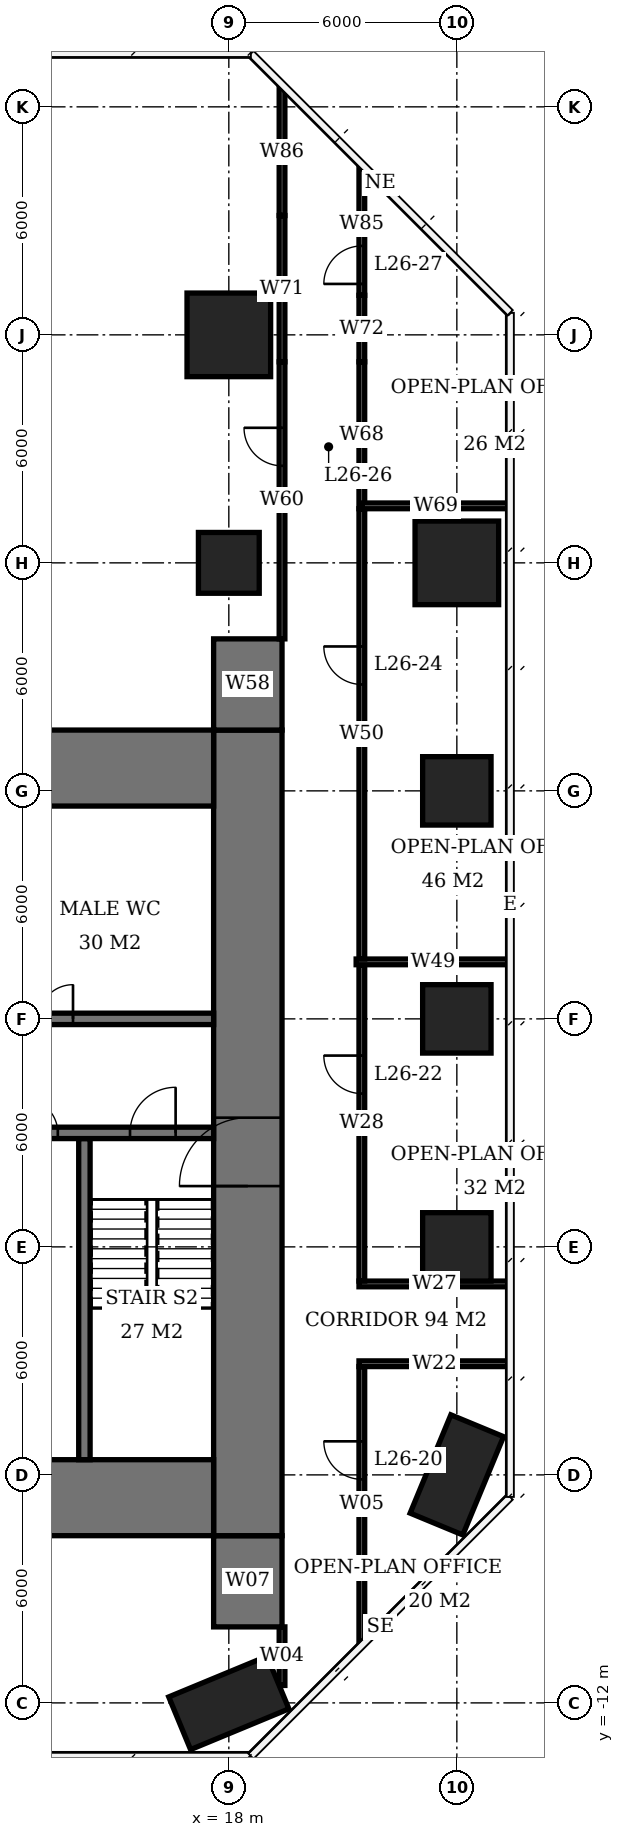
"""IFC4 building model, lengths in metres.
Left out: names, types, materials, properties, quantities, classifications, styles, units other than length and angle.
Written with IfcOpenShell. Run it as: python <this file> out.ifc"""

import sys

from ifc_helpers import new_model, si_unit, direction, frame, frame_2d, origin, origin_2d, place, context, subcontext, project, spatial, rectangle, extrude, element, fill, save


model = new_model("IFC4")
c1 = context("Model", 3, precision=1e-05, world=origin(), true_north=direction((0.0, 1.0)))
c2 = subcontext(c1, "Body", "Model", "MODEL_VIEW")
j1 = project(units=[si_unit("LENGTHUNIT", "METRE"), si_unit("PLANEANGLEUNIT", "RADIAN")], contexts=[c1])
p1 = place(None, origin())
s1 = spatial("IfcSite", under=j1, at=p1, CompositionType="ELEMENT")
p2 = place(p1, origin())
s2 = spatial("IfcBuilding", under=s1, at=p2, CompositionType="ELEMENT")
p3 = place(p2, frame((0.0, 0.0, 109.4)))
s3 = spatial("IfcBuildingStorey", under=s2, at=p3, CompositionType="ELEMENT", Elevation=109.4)
p4 = place(p3, frame((18.0, -12.0, 0.0), z_axis=(0.0, 0.0, 1.0), x_axis=(-0.923879532511, -0.382683432365, 0.0)))
e1 = element("IfcColumn", 1, at=p4, inside=s3, PredefinedType="COLUMN", context=c2, shape_type="SweptSolid", body=[
    extrude(rectangle(XDim=2.8, YDim=1.5, at=origin_2d()), origin(), (0.0, 0.0, 1.0), 3.9),
])
p5 = place(p3, frame((18.0, 18.0, 0.0), z_axis=(0.0, 0.0, 1.0), x_axis=(1.0, 0.0, 0.0)))
e2 = element("IfcColumn", 2, at=p5, inside=s3, PredefinedType="COLUMN", context=c2, shape_type="SweptSolid", body=[
    extrude(rectangle(XDim=1.6, YDim=1.6, at=origin_2d()), origin(), (0.0, 0.0, 1.0), 3.9),
])
p6 = place(p3, frame((18.0, 24.0, 0.0), z_axis=(0.0, 0.0, 1.0), x_axis=(1.0, 0.0, 0.0)))
e3 = element("IfcColumn", 3, at=p6, inside=s3, PredefinedType="COLUMN", context=c2, shape_type="SweptSolid", body=[
    extrude(rectangle(XDim=2.2, YDim=2.2, at=origin_2d()), origin(), (0.0, 0.0, 1.0), 3.9),
])
p7 = place(p3, frame((24.0, -6.0, 0.0), z_axis=(0.0, 0.0, 1.0), x_axis=(-0.382683432365, -0.923879532511, 0.0)))
e4 = element("IfcColumn", 4, at=p7, inside=s3, PredefinedType="COLUMN", context=c2, shape_type="SweptSolid", body=[
    extrude(rectangle(XDim=2.8, YDim=1.5, at=origin_2d()), origin(), (0.0, 0.0, 1.0), 3.9),
])
for number, where, z_axis, x_axis in (
    (5, (24.0, 0.0, 0.0), (0.0, 0.0, 1.0), (1.0, 0.0, 0.0)),
    (6, (24.0, 6.0, 0.0), (0.0, 0.0, 1.0), (1.0, 0.0, 0.0)),
    (7, (24.0, 12.0, 0.0), (0.0, 0.0, 1.0), (1.0, 0.0, 0.0)),
):
    element("IfcColumn", number, at=place(p3, frame(where, z_axis=z_axis, x_axis=x_axis)), inside=s3, PredefinedType="COLUMN", context=c2, shape_type="SweptSolid", body=[
        extrude(rectangle(XDim=1.8, YDim=1.8, at=origin_2d()), origin(), (0.0, 0.0, 1.0), 3.9),
    ])
p8 = place(p3, frame((24.0, 18.0, 0.0), z_axis=(0.0, 0.0, 1.0), x_axis=(1.0, 0.0, 0.0)))
e8 = element("IfcColumn", 8, at=p8, inside=s3, PredefinedType="COLUMN", context=c2, shape_type="SweptSolid", body=[
    extrude(rectangle(XDim=2.2, YDim=2.2, at=origin_2d()), origin(), (0.0, 0.0, 1.0), 3.9),
])
for number, where, z_axis, x_axis in (
    (9, (-5.6, -6.6, 0.0), (0.0, 0.0, 1.0), (1.0, 0.0, 0.0)),
    (10, (-5.6, 12.6, 0.0), (0.0, 0.0, 1.0), (1.0, 0.0, 0.0)),
):
    element("IfcWall", number, at=place(p3, frame(where, z_axis=z_axis, x_axis=x_axis)), inside=s3, PredefinedType="SHEAR", context=c2, shape_type="SweptSolid", body=[
        extrude(rectangle(XDim=23.2, YDim=2.0, at=frame_2d((11.6, 0.0))), origin(), (0.0, 0.0, 1.0), 3.9),
    ])
p9 = place(p3, frame((18.5, -7.6, 0.0), z_axis=(0.0, 0.0, 1.0), x_axis=(0.0, 1.0, 0.0)))
e11 = element("IfcWall", 11, at=p9, inside=s3, PredefinedType="SHEAR", context=c2, shape_type="SweptSolid", body=[
    extrude(rectangle(XDim=21.2, YDim=1.8, at=frame_2d((10.6, 0.0))), origin(), (0.0, 0.0, 1.0), 3.9),
])
p10 = place(p9, frame((9.2, 0.0, 0.0)))
e12 = element("IfcOpeningElement", 12, at=p10, cuts=e11, PredefinedType="OPENING", context=c2, shape_type="SweptSolid", body=[
    extrude(rectangle(XDim=1.8, YDim=2.4, at=frame_2d((0.9, 1.2))), frame((0.0, 0.91, 0.0), z_axis=(0.0, -1.0, 0.0), x_axis=(1.0, 0.0, 0.0)), (0.0, 0.0, 1.0), 1.82),
])
for number, where, z_axis, x_axis in (
    (13, (18.5, -10.0, 0.0), (0.0, 0.0, 1.0), (0.0, 1.0, 0.0)),
    (14, (18.5, 13.6, 0.0), (0.0, 0.0, 1.0), (0.0, 1.0, 0.0)),
):
    element("IfcWall", number, at=place(p3, frame(where, z_axis=z_axis, x_axis=x_axis)), inside=s3, PredefinedType="SHEAR", context=c2, shape_type="SweptSolid", body=[
        extrude(rectangle(XDim=2.4, YDim=1.8, at=frame_2d((1.2, 0.0))), origin(), (0.0, 0.0, 1.0), 3.9),
    ])
p11 = place(p3, frame((12.15, 3.0, 0.0), z_axis=(0.0, 0.0, 1.0), x_axis=(1.0, 0.0, 0.0)))
e15 = element("IfcWall", 15, at=p11, inside=s3, PredefinedType="SHEAR", context=c2, shape_type="SweptSolid", body=[
    extrude(rectangle(XDim=5.45, YDim=0.3, at=frame_2d((2.725, 0.0))), origin(), (0.0, 0.0, 1.0), 3.9),
])
p12 = place(p11, frame((3.25, 0.0, 0.0)))
e16 = element("IfcOpeningElement", 16, at=p12, cuts=e15, PredefinedType="OPENING", context=c2, shape_type="SweptSolid", body=[
    extrude(rectangle(XDim=1.2, YDim=2.1, at=frame_2d((0.6, 1.05))), frame((0.0, 0.16, 0.0), z_axis=(0.0, -1.0, 0.0), x_axis=(1.0, 0.0, 0.0)), (0.0, 0.0, 1.0), 0.32),
])
p13 = place(p11, frame((0.45, 0.0, 0.0)))
e17 = element("IfcOpeningElement", 17, at=p13, cuts=e15, PredefinedType="OPENING", context=c2, shape_type="SweptSolid", body=[
    extrude(rectangle(XDim=0.9, YDim=2.1, at=frame_2d((0.45, 1.05))), frame((0.0, 0.16, 0.0), z_axis=(0.0, -1.0, 0.0), x_axis=(1.0, 0.0, 0.0)), (0.0, 0.0, 1.0), 0.32),
])
p14 = place(p3, frame((-0.15, 6.0, 0.0), z_axis=(0.0, 0.0, 1.0), x_axis=(1.0, 0.0, 0.0)))
e18 = element("IfcWall", 18, at=p14, inside=s3, PredefinedType="SHEAR", context=c2, shape_type="SweptSolid", body=[
    extrude(rectangle(XDim=17.75, YDim=0.3, at=frame_2d((8.875, 0.0))), origin(), (0.0, 0.0, 1.0), 3.9),
])
p15 = place(p14, frame((13.15, 0.0, 0.0)))
e19 = element("IfcOpeningElement", 19, at=p15, cuts=e18, PredefinedType="OPENING", context=c2, shape_type="SweptSolid", body=[
    extrude(rectangle(XDim=0.9, YDim=2.1, at=frame_2d((0.45, 1.05))), frame((0.0, 0.16, 0.0), z_axis=(0.0, -1.0, 0.0), x_axis=(1.0, 0.0, 0.0)), (0.0, 0.0, 1.0), 0.32),
])
p16 = place(p14, frame((7.25, 0.0, 0.0)))
e20 = element("IfcOpeningElement", 20, at=p16, cuts=e18, PredefinedType="OPENING", context=c2, shape_type="SweptSolid", body=[
    extrude(rectangle(XDim=1.0, YDim=2.1, at=frame_2d((0.5, 1.05))), frame((0.0, 0.16, 0.0), z_axis=(0.0, -1.0, 0.0), x_axis=(1.0, 0.0, 0.0)), (0.0, 0.0, 1.0), 0.32),
])
p17 = place(p14, frame((1.1, 0.0, 0.0)))
e21 = element("IfcOpeningElement", 21, at=p17, cuts=e18, PredefinedType="OPENING", context=c2, shape_type="SweptSolid", body=[
    extrude(rectangle(XDim=1.1, YDim=2.1, at=frame_2d((0.55, 1.05))), frame((0.0, 0.16, 0.0), z_axis=(0.0, -1.0, 0.0), x_axis=(1.0, 0.0, 0.0)), (0.0, 0.0, 1.0), 0.32),
])
p18 = place(p14, frame((4.1, 0.0, 0.0)))
e22 = element("IfcOpeningElement", 22, at=p18, cuts=e18, PredefinedType="OPENING", context=c2, shape_type="SweptSolid", body=[
    extrude(rectangle(XDim=1.1, YDim=2.1, at=frame_2d((0.55, 1.05))), frame((0.0, 0.16, 0.0), z_axis=(0.0, -1.0, 0.0), x_axis=(1.0, 0.0, 0.0)), (0.0, 0.0, 1.0), 0.32),
])
p19 = place(p3, frame((14.2, -5.6, 0.0), z_axis=(0.0, 0.0, 1.0), x_axis=(0.0, 1.0, 0.0)))
e23 = element("IfcWall", 23, at=p19, inside=s3, PredefinedType="SHEAR", context=c2, shape_type="SweptSolid", body=[
    extrude(rectangle(XDim=8.45, YDim=0.3, at=frame_2d((4.225, 0.0))), origin(), (0.0, 0.0, 1.0), 3.9),
])
p20 = place(p3, frame((19.4, -11.541, 0.0), z_axis=(0.0, 0.0, 1.0), x_axis=(0.0, 1.0, 0.0)))
e24 = element("IfcWall", 24, at=p20, inside=s3, PredefinedType="PARTITIONING", context=c2, shape_type="SweptSolid", body=[
    extrude(rectangle(XDim=1.541, YDim=0.15, at=frame_2d((0.77, 0.0))), origin(), (0.0, 0.0, 1.0), 3.65),
])
p21 = place(p3, frame((19.4, 16.0, 0.0), z_axis=(0.0, 0.0, 1.0), x_axis=(0.0, 1.0, 0.0)))
e25 = element("IfcWall", 25, at=p21, inside=s3, PredefinedType="PARTITIONING", context=c2, shape_type="SweptSolid", body=[
    extrude(rectangle(XDim=7.29, YDim=0.15, at=frame_2d((3.645, 0.0))), origin(), (0.0, 0.0, 1.0), 3.65),
])
p22 = place(p21, frame((4.554, 0.0, 0.0)))
e26 = element("IfcOpeningElement", 26, at=p22, cuts=e25, PredefinedType="OPENING", context=c2, shape_type="SweptSolid", body=[
    extrude(rectangle(XDim=1.0, YDim=2.1, at=frame_2d((0.5, 1.05))), frame((0.0, 0.085, 0.0), z_axis=(0.0, -1.0, 0.0), x_axis=(1.0, 0.0, 0.0)), (0.0, 0.0, 1.0), 0.17),
])
p23 = place(p3, frame((19.4, 23.29, 0.0), z_axis=(0.0, 0.0, 1.0), x_axis=(0.0, 1.0, 0.0)))
e27 = element("IfcWall", 27, at=p23, inside=s3, PredefinedType="PARTITIONING", context=c2, shape_type="SweptSolid", body=[
    extrude(rectangle(XDim=3.85, YDim=0.15, at=frame_2d((1.925, 0.0))), origin(), (0.0, 0.0, 1.0), 2.65),
])
p24 = place(p3, frame((19.4, 27.14, 0.0), z_axis=(0.0, 0.0, 1.0), x_axis=(0.0, 1.0, 0.0)))
e28 = element("IfcWall", 28, at=p24, inside=s3, PredefinedType="PARTITIONING", context=c2, shape_type="SweptSolid", body=[
    extrude(rectangle(XDim=3.349, YDim=0.15, at=frame_2d((1.675, 0.0))), origin(), (0.0, 0.0, 1.0), 3.65),
])
p25 = place(p3, frame((21.5, -10.388, 0.0), z_axis=(0.0, 0.0, 1.0), x_axis=(0.0, 1.0, 0.0)))
e29 = element("IfcWall", 29, at=p25, inside=s3, PredefinedType="PARTITIONING", context=c2, shape_type="SweptSolid", body=[
    extrude(rectangle(XDim=7.238, YDim=0.15, at=frame_2d((3.619, 0.0))), origin(), (0.0, 0.0, 1.0), 3.65),
])
p26 = place(p25, frame((4.271, 0.0, 0.0)))
e30 = element("IfcOpeningElement", 30, at=p26, cuts=e29, PredefinedType="OPENING", context=c2, shape_type="SweptSolid", body=[
    extrude(rectangle(XDim=1.0, YDim=2.1, at=frame_2d((0.5, 1.05))), frame((0.0, 0.085, 0.0), z_axis=(0.0, -1.0, 0.0), x_axis=(1.0, 0.0, 0.0)), (0.0, 0.0, 1.0), 0.17),
])
p27 = place(p3, frame((21.425, -3.075, 0.0), z_axis=(0.0, 0.0, 1.0), x_axis=(1.0, 0.0, 0.0)))
e31 = element("IfcWall", 31, at=p27, inside=s3, PredefinedType="PARTITIONING", context=c2, shape_type="SweptSolid", body=[
    extrude(rectangle(XDim=3.975, YDim=0.15, at=frame_2d((1.987, 0.0))), origin(), (0.0, 0.0, 1.0), 3.65),
])
p28 = place(p3, frame((21.5, -0.9, 0.0), z_axis=(0.0, 0.0, 1.0), x_axis=(0.0, 1.0, 0.0)))
e32 = element("IfcWall", 32, at=p28, inside=s3, PredefinedType="PARTITIONING", context=c2, shape_type="SweptSolid", body=[
    extrude(rectangle(XDim=8.325, YDim=0.15, at=frame_2d((4.163, 0.0))), origin(), (0.0, 0.0, 1.0), 3.65),
])
p29 = place(p28, frame((4.934, 0.0, 0.0)))
e33 = element("IfcOpeningElement", 33, at=p29, cuts=e32, PredefinedType="OPENING", context=c2, shape_type="SweptSolid", body=[
    extrude(rectangle(XDim=1.0, YDim=2.1, at=frame_2d((0.5, 1.05))), frame((0.0, 0.085, 0.0), z_axis=(0.0, -1.0, 0.0), x_axis=(1.0, 0.0, 0.0)), (0.0, 0.0, 1.0), 0.17),
])
p30 = place(p3, frame((21.425, -0.975, 0.0), z_axis=(0.0, 0.0, 1.0), x_axis=(1.0, 0.0, 0.0)))
e34 = element("IfcWall", 34, at=p30, inside=s3, PredefinedType="PARTITIONING", context=c2, shape_type="SweptSolid", body=[
    extrude(rectangle(XDim=3.975, YDim=0.15, at=frame_2d((1.987, 0.0))), origin(), (0.0, 0.0, 1.0), 3.65),
])
p31 = place(p3, frame((21.5, 7.575, 0.0), z_axis=(0.0, 0.0, 1.0), x_axis=(0.0, 1.0, 0.0)))
e35 = element("IfcWall", 35, at=p31, inside=s3, PredefinedType="PARTITIONING", context=c2, shape_type="SweptSolid", body=[
    extrude(rectangle(XDim=11.85, YDim=0.15, at=frame_2d((5.925, 0.0))), origin(), (0.0, 0.0, 1.0), 3.65),
])
p32 = place(p31, frame((7.225, 0.0, 0.0)))
e36 = element("IfcOpeningElement", 36, at=p32, cuts=e35, PredefinedType="OPENING", context=c2, shape_type="SweptSolid", body=[
    extrude(rectangle(XDim=1.0, YDim=2.1, at=frame_2d((0.5, 1.05))), frame((0.0, 0.085, 0.0), z_axis=(0.0, -1.0, 0.0), x_axis=(1.0, 0.0, 0.0)), (0.0, 0.0, 1.0), 0.17),
])
p33 = place(p3, frame((21.35, 7.5, 0.0), z_axis=(0.0, 0.0, 1.0), x_axis=(1.0, 0.0, 0.0)))
e37 = element("IfcWall", 37, at=p33, inside=s3, PredefinedType="PARTITIONING", context=c2, shape_type="SweptSolid", body=[
    extrude(rectangle(XDim=4.05, YDim=0.15, at=frame_2d((2.025, 0.0))), origin(), (0.0, 0.0, 1.0), 3.65),
])
p34 = place(p3, frame((21.5, 19.425, 0.0), z_axis=(0.0, 0.0, 1.0), x_axis=(0.0, 1.0, 0.0)))
e38 = element("IfcWall", 38, at=p34, inside=s3, PredefinedType="PARTITIONING", context=c2, shape_type="SweptSolid", body=[
    extrude(rectangle(XDim=3.865, YDim=0.15, at=frame_2d((1.933, 0.0))), origin(), (0.0, 0.0, 1.0), 3.65),
])
p35 = place(p3, frame((21.5, 23.29, 0.0), z_axis=(0.0, 0.0, 1.0), x_axis=(0.0, 1.0, 0.0)))
e39 = element("IfcWall", 39, at=p35, inside=s3, PredefinedType="PARTITIONING", context=c2, shape_type="SweptSolid", body=[
    extrude(rectangle(XDim=1.75, YDim=0.15, at=frame_2d((0.875, 0.0))), origin(), (0.0, 0.0, 1.0), 2.65),
])
p36 = place(p3, frame((21.5, 25.04, 0.0), z_axis=(0.0, 0.0, 1.0), x_axis=(0.0, 1.0, 0.0)))
e40 = element("IfcWall", 40, at=p36, inside=s3, PredefinedType="PARTITIONING", context=c2, shape_type="SweptSolid", body=[
    extrude(rectangle(XDim=3.348, YDim=0.15, at=frame_2d((1.674, 0.0))), origin(), (0.0, 0.0, 1.0), 3.65),
])
p37 = place(p36, frame((0.3, 0.0, 0.0)))
e41 = element("IfcOpeningElement", 41, at=p37, cuts=e40, PredefinedType="OPENING", context=c2, shape_type="SweptSolid", body=[
    extrude(rectangle(XDim=1.0, YDim=2.1, at=frame_2d((0.5, 1.05))), frame((0.0, 0.085, 0.0), z_axis=(0.0, -1.0, 0.0), x_axis=(1.0, 0.0, 0.0)), (0.0, 0.0, 1.0), 0.17),
])
p38 = place(p3, frame((21.5, 19.5, 0.0), z_axis=(0.0, 0.0, 1.0), x_axis=(1.0, 0.0, 0.0)))
e42 = element("IfcWall", 42, at=p38, inside=s3, PredefinedType="PARTITIONING", context=c2, shape_type="SweptSolid", body=[
    extrude(rectangle(XDim=3.9, YDim=0.15, at=frame_2d((1.95, 0.0))), origin(), (0.0, 0.0, 1.0), 3.65),
])
p39 = place(p10, origin())
e43 = element("IfcDoor", 43, at=p39, inside=s3, OperationType="DOUBLE_DOOR_SINGLE_SWING", PredefinedType="DOOR", context=c2, shape_type="SweptSolid", body=[
    extrude(rectangle(XDim=1.8, YDim=2.4, at=frame_2d((0.9, 1.2))), frame((0.0, 0.025, 0.0), z_axis=(0.0, -1.0, 0.0), x_axis=(1.0, 0.0, 0.0)), (0.0, 0.0, 1.0), 0.05),
])
fill(e12, e43)
p40 = place(p12, origin())
e44 = element("IfcDoor", 44, at=p40, inside=s3, OperationType="SINGLE_SWING_RIGHT", PredefinedType="DOOR", context=c2, shape_type="SweptSolid", body=[
    extrude(rectangle(XDim=1.2, YDim=2.1, at=frame_2d((0.6, 1.05))), frame((0.0, 0.025, 0.0), z_axis=(0.0, -1.0, 0.0), x_axis=(1.0, 0.0, 0.0)), (0.0, 0.0, 1.0), 0.05),
])
fill(e16, e44)
p41 = place(p13, origin())
e45 = element("IfcDoor", 45, at=p41, inside=s3, OperationType="SINGLE_SWING_LEFT", PredefinedType="DOOR", context=c2, shape_type="SweptSolid", body=[
    extrude(rectangle(XDim=0.9, YDim=2.1, at=frame_2d((0.45, 1.05))), frame((0.0, 0.025, 0.0), z_axis=(0.0, -1.0, 0.0), x_axis=(1.0, 0.0, 0.0)), (0.0, 0.0, 1.0), 0.05),
])
fill(e17, e45)
p42 = place(p15, origin())
e46 = element("IfcDoor", 46, at=p42, inside=s3, OperationType="SINGLE_SWING_RIGHT", PredefinedType="DOOR", context=c2, shape_type="SweptSolid", body=[
    extrude(rectangle(XDim=0.9, YDim=2.1, at=frame_2d((0.45, 1.05))), frame((0.0, 0.025, 0.0), z_axis=(0.0, -1.0, 0.0), x_axis=(1.0, 0.0, 0.0)), (0.0, 0.0, 1.0), 0.05),
])
fill(e19, e46)
p43 = place(p26, origin())
e47 = element("IfcDoor", 47, at=p43, inside=s3, OperationType="SINGLE_SWING_RIGHT", PredefinedType="DOOR", context=c2, shape_type="SweptSolid", body=[
    extrude(rectangle(XDim=1.0, YDim=2.1, at=frame_2d((0.5, 1.05))), frame((0.0, 0.025, 0.0), z_axis=(0.0, -1.0, 0.0), x_axis=(1.0, 0.0, 0.0)), (0.0, 0.0, 1.0), 0.05),
])
fill(e30, e47)
p44 = place(p29, origin())
e48 = element("IfcDoor", 48, at=p44, inside=s3, OperationType="SINGLE_SWING_RIGHT", PredefinedType="DOOR", context=c2, shape_type="SweptSolid", body=[
    extrude(rectangle(XDim=1.0, YDim=2.1, at=frame_2d((0.5, 1.05))), frame((0.0, 0.025, 0.0), z_axis=(0.0, -1.0, 0.0), x_axis=(1.0, 0.0, 0.0)), (0.0, 0.0, 1.0), 0.05),
])
fill(e33, e48)
p45 = place(p32, origin())
e49 = element("IfcDoor", 49, at=p45, inside=s3, OperationType="SINGLE_SWING_RIGHT", PredefinedType="DOOR", context=c2, shape_type="SweptSolid", body=[
    extrude(rectangle(XDim=1.0, YDim=2.1, at=frame_2d((0.5, 1.05))), frame((0.0, 0.025, 0.0), z_axis=(0.0, -1.0, 0.0), x_axis=(1.0, 0.0, 0.0)), (0.0, 0.0, 1.0), 0.05),
])
fill(e36, e49)
p46 = place(p22, origin())
e50 = element("IfcDoor", 50, at=p46, inside=s3, OperationType="SINGLE_SWING_RIGHT", PredefinedType="DOOR", context=c2, shape_type="SweptSolid", body=[
    extrude(rectangle(XDim=1.0, YDim=2.1, at=frame_2d((0.5, 1.05))), frame((0.0, 0.025, 0.0), z_axis=(0.0, -1.0, 0.0), x_axis=(1.0, 0.0, 0.0)), (0.0, 0.0, 1.0), 0.05),
])
fill(e26, e50)
p47 = place(p37, origin())
e51 = element("IfcDoor", 51, at=p47, inside=s3, OperationType="SINGLE_SWING_LEFT", PredefinedType="DOOR", context=c2, shape_type="SweptSolid", body=[
    extrude(rectangle(XDim=1.0, YDim=2.1, at=frame_2d((0.5, 1.05))), frame((0.0, 0.025, 0.0), z_axis=(0.0, -1.0, 0.0), x_axis=(1.0, 0.0, 0.0)), (0.0, 0.0, 1.0), 0.05),
])
fill(e41, e51)
save(model, sys.argv[1])
